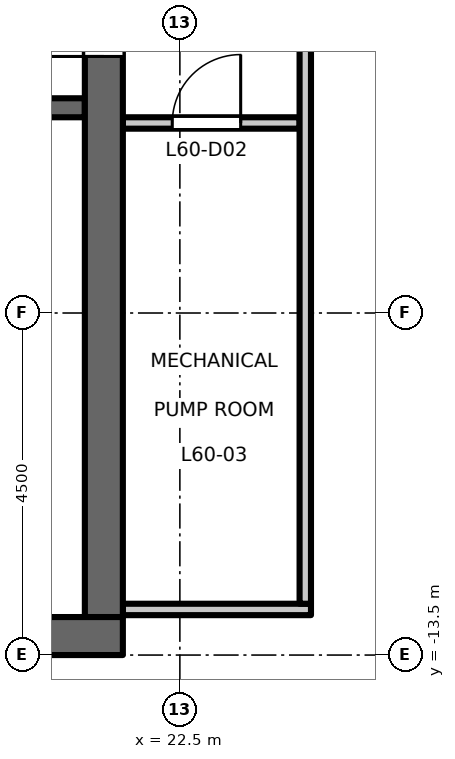
"""IFC4 building model, lengths in metres.
Left out: names, types, materials, properties, quantities, classifications, styles, units other than length and angle.
Written with IfcOpenShell. Run it as: python <this file> out.ifc"""

import sys

from ifc_helpers import new_model, si_unit, direction, frame, frame_2d, origin, place, context, subcontext, project, spatial, rectangle, extrude, element, fill, save


model = new_model("IFC4")
c1 = context("Model", 3, precision=1e-05, world=origin(), true_north=direction((0.0, 1.0)))
c2 = subcontext(c1, "Body", "Model", "MODEL_VIEW")
j1 = project(units=[si_unit("LENGTHUNIT", "METRE"), si_unit("PLANEANGLEUNIT", "RADIAN")], contexts=[c1])
p1 = place(None, origin())
s1 = spatial("IfcSite", under=j1, at=p1, CompositionType="ELEMENT")
p2 = place(p1, origin())
s2 = spatial("IfcBuilding", under=s1, at=p2, CompositionType="ELEMENT")
p3 = place(p2, frame((0.0, 0.0, 278.2)))
s3 = spatial("IfcBuildingStorey", under=s2, at=p3, CompositionType="ELEMENT", Elevation=278.2)
p4 = place(p3, frame((12.15, -6.3, 0.0), z_axis=(0.0, 0.0, 1.0), x_axis=(1.0, 0.0, 0.0)))
e1 = element("IfcWall", 1, at=p4, inside=s3, PredefinedType="SHEAR", context=c2, shape_type="SweptSolid", body=[
    extrude(rectangle(XDim=9.1, YDim=0.25, at=frame_2d((4.55, 0.0))), origin(), (0.0, 0.0, 1.0), 5.8),
])
p5 = place(p4, frame((1.8, 0.0, 0.0)))
e2 = element("IfcOpeningElement", 2, at=p5, cuts=e1, PredefinedType="OPENING", context=c2, shape_type="SweptSolid", body=[
    extrude(rectangle(XDim=1.0, YDim=2.1, at=frame_2d((0.5, 1.05))), frame((0.0, 0.135, 0.0), z_axis=(0.0, -1.0, 0.0), x_axis=(1.0, 0.0, 0.0)), (0.0, 0.0, 1.0), 0.27),
])
p6 = place(p3, frame((21.5, -13.0, 0.0), z_axis=(0.0, 0.0, 1.0), x_axis=(0.0, 1.0, 0.0)))
e3 = element("IfcWall", 3, at=p6, inside=s3, PredefinedType="SHEAR", context=c2, shape_type="SweptSolid", body=[
    extrude(rectangle(XDim=26.0, YDim=0.5, at=frame_2d((13.0, 0.0))), origin(), (0.0, 0.0, 1.0), 5.8),
])
p7 = place(p6, frame((16.825, 0.0, 0.0)))
e4 = element("IfcOpeningElement", 4, at=p7, cuts=e3, PredefinedType="OPENING", context=c2, shape_type="SweptSolid", body=[
    extrude(rectangle(XDim=1.8, YDim=2.1, at=frame_2d((0.9, 1.05))), frame((0.0, 0.26, 0.0), z_axis=(0.0, -1.0, 0.0), x_axis=(1.0, 0.0, 0.0)), (0.0, 0.0, 1.0), 0.52),
])
p8 = place(p6, frame((7.375, 0.0, 0.0)))
e5 = element("IfcOpeningElement", 5, at=p8, cuts=e3, PredefinedType="OPENING", context=c2, shape_type="SweptSolid", body=[
    extrude(rectangle(XDim=1.8, YDim=2.1, at=frame_2d((0.9, 1.05))), frame((0.0, 0.26, 0.0), z_axis=(0.0, -1.0, 0.0), x_axis=(1.0, 0.0, 0.0)), (0.0, 0.0, 1.0), 0.52),
])
p9 = place(p3, frame((8.25, -13.25, 0.0), z_axis=(0.0, 0.0, 1.0), x_axis=(1.0, 0.0, 0.0)))
e6 = element("IfcWall", 6, at=p9, inside=s3, PredefinedType="SHEAR", context=c2, shape_type="SweptSolid", body=[
    extrude(rectangle(XDim=13.5, YDim=0.5, at=frame_2d((6.75, 0.0))), origin(), (0.0, 0.0, 1.0), 5.8),
])
p10 = place(p3, frame((21.75, -12.9, 0.0), z_axis=(0.0, 0.0, 1.0), x_axis=(1.0, 0.0, 0.0)))
e7 = element("IfcWall", 7, at=p10, inside=s3, PredefinedType="PARTITIONING", context=c2, shape_type="SweptSolid", body=[
    extrude(rectangle(XDim=2.475, YDim=0.15, at=frame_2d((1.238, 0.0))), origin(), (0.0, 0.0, 1.0), 5.8),
])
p11 = place(p3, frame((21.75, -6.5, 0.0), z_axis=(0.0, 0.0, 1.0), x_axis=(1.0, 0.0, 0.0)))
e8 = element("IfcWall", 8, at=p11, inside=s3, PredefinedType="PARTITIONING", context=c2, shape_type="SweptSolid", body=[
    extrude(rectangle(XDim=2.325, YDim=0.15, at=frame_2d((1.163, 0.0))), origin(), (0.0, 0.0, 1.0), 5.8),
])
p12 = place(p11, frame((0.65, 0.0, 0.0)))
e9 = element("IfcOpeningElement", 9, at=p12, cuts=e8, PredefinedType="OPENING", context=c2, shape_type="SweptSolid", body=[
    extrude(rectangle(XDim=0.9, YDim=2.1, at=frame_2d((0.45, 1.05))), frame((0.0, 0.085, 0.0), z_axis=(0.0, -1.0, 0.0), x_axis=(1.0, 0.0, 0.0)), (0.0, 0.0, 1.0), 0.17),
])
p13 = place(p3, frame((24.15, -12.825, 0.0), z_axis=(0.0, 0.0, 1.0), x_axis=(0.0, 1.0, 0.0)))
e10 = element("IfcWall", 10, at=p13, inside=s3, PredefinedType="PARTITIONING", context=c2, shape_type="SweptSolid", body=[
    extrude(rectangle(XDim=25.65, YDim=0.15, at=frame_2d((12.825, 0.0))), origin(), (0.0, 0.0, 1.0), 5.8),
])
p14 = place(p8, origin())
e11 = element("IfcDoor", 11, at=p14, inside=s3, OperationType="DOUBLE_DOOR_DOUBLE_SWING", PredefinedType="DOOR", context=c2, shape_type="SweptSolid", body=[
    extrude(rectangle(XDim=1.8, YDim=2.1, at=frame_2d((0.9, 1.05))), frame((0.0, 0.025, 0.0), z_axis=(0.0, -1.0, 0.0), x_axis=(1.0, 0.0, 0.0)), (0.0, 0.0, 1.0), 0.05),
])
fill(e5, e11)
p15 = place(p12, origin())
e12 = element("IfcDoor", 12, at=p15, inside=s3, OperationType="SINGLE_SWING_RIGHT", PredefinedType="DOOR", context=c2, shape_type="SweptSolid", body=[
    extrude(rectangle(XDim=0.9, YDim=2.1, at=frame_2d((0.45, 1.05))), frame((0.0, 0.025, 0.0), z_axis=(0.0, -1.0, 0.0), x_axis=(1.0, 0.0, 0.0)), (0.0, 0.0, 1.0), 0.05),
])
fill(e9, e12)
save(model, sys.argv[1])
